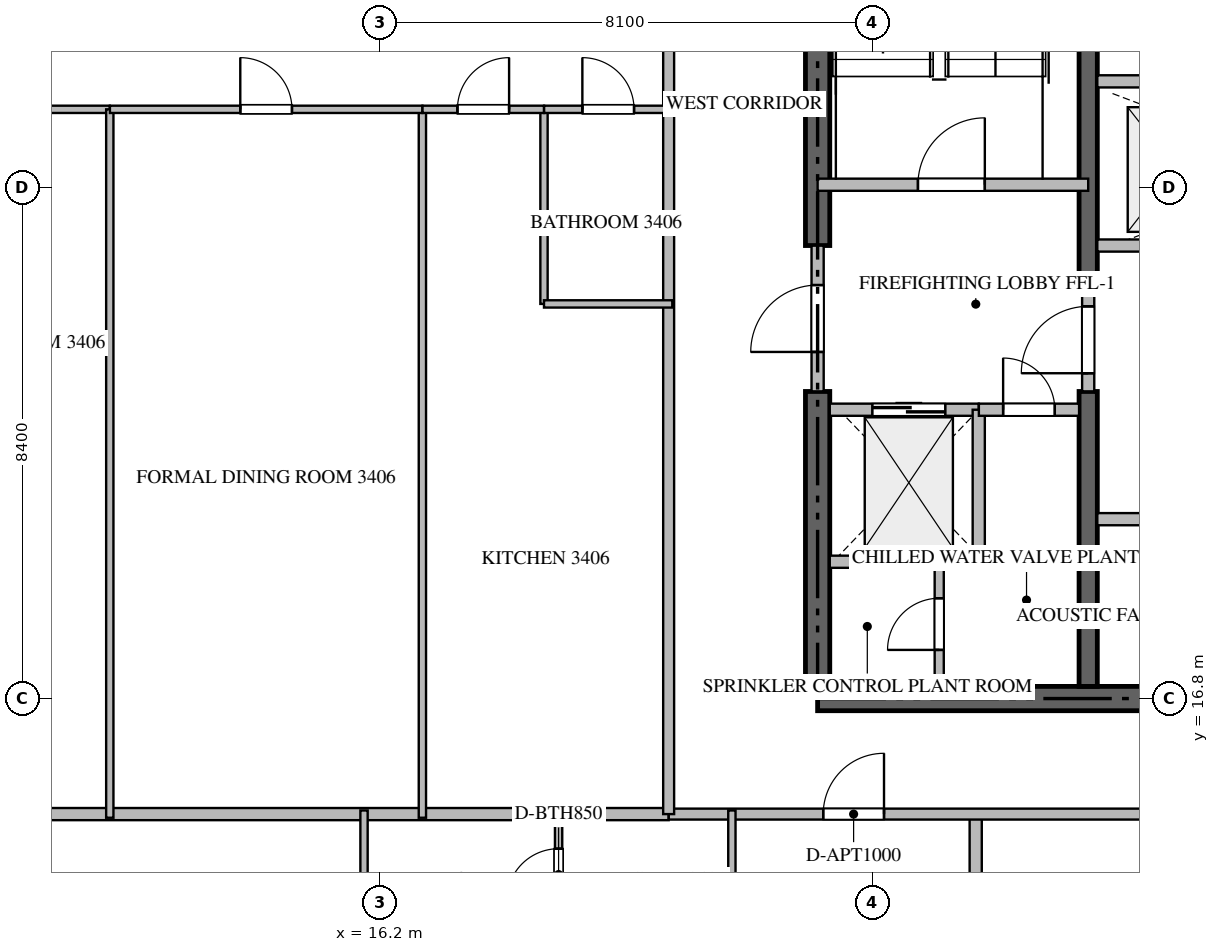
"""IFC4 building model, lengths in metres.
Left out: names, types, materials, properties, quantities, classifications, styles, units other than length and angle.
Written with IfcOpenShell. Run it as: python <this file> out.ifc"""

import sys

from ifc_helpers import new_model, si_unit, direction, frame, frame_2d, origin, place, context, subcontext, project, spatial, rectangle, extrude, source, transform, mapped, element, fill, save


model = new_model("IFC4")
c1 = context("Model", 3, precision=1e-05, world=origin(), true_north=direction((0.0, 1.0)))
c2 = subcontext(c1, "Body", "Model", "MODEL_VIEW")
j1 = project(units=[si_unit("LENGTHUNIT", "METRE"), si_unit("PLANEANGLEUNIT", "RADIAN")], contexts=[c1])
p1 = place(None, origin())
s1 = spatial("IfcSite", under=j1, at=p1, CompositionType="ELEMENT")
p2 = place(p1, origin())
s2 = spatial("IfcBuilding", under=s1, at=p2, CompositionType="ELEMENT")
p3 = place(p2, frame((0.0, 0.0, 138.9)))
s3 = spatial("IfcBuildingStorey", under=s2, at=p3, CompositionType="ELEMENT", Elevation=138.9)
p4 = place(p3, frame((23.4, 16.8, -0.26), z_axis=(0.0, 0.0, 1.0), x_axis=(1.0, 0.0, 0.0)))
e1 = element("IfcWall", 1, at=p4, inside=s3, PredefinedType="SHEAR", context=c2, shape_type="SweptSolid", body=[
    extrude(rectangle(XDim=18.0, YDim=0.4, at=frame_2d((9.0, 0.0))), origin(), (0.0, 0.0, 1.0), 3.748),
])
p5 = place(p3, frame((23.4, 17.0, -0.26), z_axis=(0.0, 0.0, 1.0), x_axis=(0.0, 1.0, 0.0)))
e2 = element("IfcWall", 2, at=p5, inside=s3, PredefinedType="SHEAR", context=c2, shape_type="SweptSolid", body=[
    extrude(rectangle(XDim=4.85, YDim=0.4, at=frame_2d((2.425, 0.0))), origin(), (0.0, 0.0, 1.0), 3.748),
])
p6 = place(p3, frame((23.4, 24.25, -0.26), z_axis=(0.0, 0.0, 1.0), x_axis=(0.0, 1.0, 0.0)))
e3 = element("IfcWall", 3, at=p6, inside=s3, PredefinedType="SHEAR", context=c2, shape_type="SweptSolid", body=[
    extrude(rectangle(XDim=9.15, YDim=0.4, at=frame_2d((4.575, 0.0))), origin(), (0.0, 0.0, 1.0), 3.748),
])
p7 = place(p3, frame((27.85, 17.0, -0.26), z_axis=(0.0, 0.0, 1.0), x_axis=(0.0, 1.0, 0.0)))
e4 = element("IfcWall", 4, at=p7, inside=s3, PredefinedType="SHEAR", context=c2, shape_type="SweptSolid", body=[
    extrude(rectangle(XDim=4.85, YDim=0.3, at=frame_2d((2.425, 0.0))), origin(), (0.0, 0.0, 1.0), 3.748),
])
p8 = place(p3, frame((27.85, 23.55, -0.26), z_axis=(0.0, 0.0, 1.0), x_axis=(0.0, 1.0, 0.0)))
e5 = element("IfcWall", 5, at=p8, inside=s3, PredefinedType="SHEAR", context=c2, shape_type="SweptSolid", body=[
    extrude(rectangle(XDim=9.85, YDim=0.3, at=frame_2d((4.925, 0.0))), origin(), (0.0, 0.0, 1.0), 3.748),
])
p9 = place(p3, frame((23.4, 25.25, 0.0), z_axis=(0.0, 0.0, 1.0), x_axis=(1.0, 0.0, 0.0)))
e6 = element("IfcWall", 6, at=p9, inside=s3, PredefinedType="STANDARD", context=c2, shape_type="SweptSolid", body=[
    extrude(rectangle(XDim=4.45, YDim=0.2, at=frame_2d((2.225, 0.0))), origin(), (0.0, 0.0, 1.0), 3.49),
])
p10 = place(p9, frame((1.65, 0.0, 0.0)))
e7 = element("IfcOpeningElement", 7, at=p10, cuts=e6, PredefinedType="OPENING", context=c2, shape_type="SweptSolid", body=[
    extrude(rectangle(XDim=1.1, YDim=2.15, at=frame_2d((0.55, 1.075))), frame((0.0, 0.11, 0.0), z_axis=(0.0, -1.0, 0.0), x_axis=(1.0, 0.0, 0.0)), (0.0, 0.0, 1.0), 0.22),
])
p11 = place(p3, frame((23.6, 21.55, 0.0), z_axis=(0.0, 0.0, 1.0), x_axis=(1.0, 0.0, 0.0)))
e8 = element("IfcWall", 8, at=p11, inside=s3, PredefinedType="STANDARD", context=c2, shape_type="SweptSolid", body=[
    extrude(rectangle(XDim=2.45, YDim=0.2, at=frame_2d((1.225, 0.0))), origin(), (0.0, 0.0, 1.0), 3.49),
])
p12 = place(p11, frame((0.7, 0.0, 0.0)))
e9 = element("IfcOpeningElement", 9, at=p12, cuts=e8, PredefinedType="OPENING", context=c2, shape_type="SweptSolid", body=[
    extrude(rectangle(XDim=1.2, YDim=2.2, at=frame_2d((0.6, 1.1))), frame((0.0, 0.11, 0.0), z_axis=(0.0, -1.0, 0.0), x_axis=(1.0, 0.0, 0.0)), (0.0, 0.0, 1.0), 0.22),
])
p13 = place(p3, frame((28.0, 24.25, 0.0), z_axis=(0.0, 0.0, 1.0), x_axis=(1.0, 0.0, 0.0)))
e10 = element("IfcWall", 10, at=p13, inside=s3, PredefinedType="STANDARD", context=c2, shape_type="SweptSolid", body=[
    extrude(rectangle(XDim=2.425, YDim=0.2, at=frame_2d((1.212, 0.0))), origin(), (0.0, 0.0, 1.0), 3.49),
])
p14 = place(p13, frame((0.75, 0.0, 0.0)))
e11 = element("IfcOpeningElement", 11, at=p14, cuts=e10, PredefinedType="OPENING", context=c2, shape_type="SweptSolid", body=[
    extrude(rectangle(XDim=1.1, YDim=2.2, at=frame_2d((0.55, 1.1))), frame((0.0, 0.11, 0.0), z_axis=(0.0, -1.0, 0.0), x_axis=(1.0, 0.0, 0.0)), (0.0, 0.0, 1.0), 0.22),
])
p15 = place(p3, frame((26.05, 19.05, 0.0), z_axis=(0.0, 0.0, 1.0), x_axis=(0.0, 1.0, 0.0)))
e12 = element("IfcWall", 12, at=p15, inside=s3, PredefinedType="STANDARD", context=c2, shape_type="SweptSolid", body=[
    extrude(rectangle(XDim=2.5, YDim=0.2, at=frame_2d((1.25, 0.0))), origin(), (0.0, 0.0, 1.0), 3.49),
])
p16 = place(p3, frame((23.6, 19.05, 0.0), z_axis=(0.0, 0.0, 1.0), x_axis=(1.0, 0.0, 0.0)))
e13 = element("IfcWall", 13, at=p16, inside=s3, PredefinedType="STANDARD", context=c2, shape_type="SweptSolid", body=[
    extrude(rectangle(XDim=2.45, YDim=0.2, at=frame_2d((1.225, 0.0))), origin(), (0.0, 0.0, 1.0), 3.49),
])
p17 = place(p3, frame((26.052, 21.55, 0.0), z_axis=(0.0, 0.0, 1.0), x_axis=(1.0, 0.0, 0.0)))
e14 = element("IfcWall", 14, at=p17, inside=s3, PredefinedType="STANDARD", context=c2, shape_type="SweptSolid", body=[
    extrude(rectangle(XDim=1.648, YDim=0.2, at=frame_2d((0.824, 0.0))), origin(), (0.0, 0.0, 1.0), 3.49),
])
p18 = place(p17, frame((0.399, 0.0, 0.0)))
e15 = element("IfcOpeningElement", 15, at=p18, cuts=e14, PredefinedType="OPENING", context=c2, shape_type="SweptSolid", body=[
    extrude(rectangle(XDim=0.85, YDim=2.1, at=frame_2d((0.425, 1.05))), frame((0.0, 0.11, 0.0), z_axis=(0.0, -1.0, 0.0), x_axis=(1.0, 0.0, 0.0)), (0.0, 0.0, 1.0), 0.22),
])
p19 = place(p3, frame((23.4, 21.852, 0.0), z_axis=(0.0, 0.0, 1.0), x_axis=(0.0, 1.0, 0.0)))
e16 = element("IfcWall", 16, at=p19, inside=s3, PredefinedType="STANDARD", context=c2, shape_type="SweptSolid", body=[
    extrude(rectangle(XDim=2.396, YDim=0.2, at=frame_2d((1.198, 0.0))), origin(), (0.0, 0.0, 1.0), 3.49),
])
p20 = place(p19, frame((0.648, 0.0, 0.0)))
e17 = element("IfcOpeningElement", 17, at=p20, cuts=e16, PredefinedType="OPENING", context=c2, shape_type="SweptSolid", body=[
    extrude(rectangle(XDim=1.1, YDim=2.15, at=frame_2d((0.55, 1.075))), frame((0.0, 0.11, 0.0), z_axis=(0.0, -1.0, 0.0), x_axis=(1.0, 0.0, 0.0)), (0.0, 0.0, 1.0), 0.22),
])
p21 = place(p3, frame((27.85, 21.852, 0.0), z_axis=(0.0, 0.0, 1.0), x_axis=(0.0, 1.0, 0.0)))
e18 = element("IfcWall", 18, at=p21, inside=s3, PredefinedType="STANDARD", context=c2, shape_type="SweptSolid", body=[
    extrude(rectangle(XDim=1.696, YDim=0.2, at=frame_2d((0.848, 0.0))), origin(), (0.0, 0.0, 1.0), 3.49),
])
p22 = place(p21, frame((0.298, 0.0, 0.0)))
e19 = element("IfcOpeningElement", 19, at=p22, cuts=e18, PredefinedType="OPENING", context=c2, shape_type="SweptSolid", body=[
    extrude(rectangle(XDim=1.1, YDim=2.15, at=frame_2d((0.55, 1.075))), frame((0.0, 0.11, 0.0), z_axis=(0.0, -1.0, 0.0), x_axis=(1.0, 0.0, 0.0)), (0.0, 0.0, 1.0), 0.22),
])
p23 = place(p3, frame((28.0, 26.95, 0.0), z_axis=(0.0, 0.0, 1.0), x_axis=(1.0, 0.0, 0.0)))
e20 = element("IfcWall", 20, at=p23, inside=s3, PredefinedType="STANDARD", context=c2, shape_type="SweptSolid", body=[
    extrude(rectangle(XDim=6.95, YDim=0.2, at=frame_2d((3.475, 0.0))), origin(), (0.0, 0.0, 1.0), 3.49),
])
p24 = place(p3, frame((25.4, 17.0, 0.0), z_axis=(0.0, 0.0, 1.0), x_axis=(0.0, 1.0, 0.0)))
e21 = element("IfcWall", 21, at=p24, inside=s3, PredefinedType="PARTITIONING", context=c2, shape_type="SweptSolid", body=[
    extrude(rectangle(XDim=2.05, YDim=0.15, at=frame_2d((1.025, 0.0))), origin(), (0.0, 0.0, 1.0), 3.49),
])
p25 = place(p24, frame((0.6, 0.0, 0.0)))
e22 = element("IfcOpeningElement", 22, at=p25, cuts=e21, PredefinedType="OPENING", context=c2, shape_type="SweptSolid", body=[
    extrude(rectangle(XDim=0.85, YDim=2.1, at=frame_2d((0.425, 1.05))), frame((0.0, 0.085, 0.0), z_axis=(0.0, -1.0, 0.0), x_axis=(1.0, 0.0, 0.0)), (0.0, 0.0, 1.0), 0.17),
])
p26 = place(p3, frame((28.0, 19.75, 0.0), z_axis=(0.0, 0.0, 1.0), x_axis=(1.0, 0.0, 0.0)))
e23 = element("IfcWall", 23, at=p26, inside=s3, PredefinedType="STANDARD", context=c2, shape_type="SweptSolid", body=[
    extrude(rectangle(XDim=4.4, YDim=0.2, at=frame_2d((2.2, 0.0))), origin(), (0.0, 0.0, 1.0), 3.49),
])
p27 = place(p26, frame((1.75, 0.0, 0.0)))
e24 = element("IfcOpeningElement", 24, at=p27, cuts=e23, PredefinedType="OPENING", context=c2, shape_type="SweptSolid", body=[
    extrude(rectangle(XDim=0.9, YDim=2.1, at=frame_2d((0.45, 1.05))), frame((0.0, 0.11, 0.0), z_axis=(0.0, -1.0, 0.0), x_axis=(1.0, 0.0, 0.0)), (0.0, 0.0, 1.0), 0.22),
])
p28 = place(p3, frame((26.0, 1.482, 0.0), z_axis=(0.0, 0.0, 1.0), x_axis=(0.0, 1.0, 0.0)))
e25 = element("IfcWall", 25, at=p28, inside=s3, PredefinedType="PARTITIONING", context=c2, shape_type="SweptSolid", body=[
    extrude(rectangle(XDim=13.418, YDim=0.2, at=frame_2d((6.709, 0.0))), origin(), (0.0, 0.0, 1.0), 3.49),
])
p29 = place(p3, frame((7.882, 14.9, 0.0), z_axis=(0.0, 0.0, 1.0), x_axis=(1.0, 0.0, 0.0)))
e26 = element("IfcWall", 26, at=p29, inside=s3, PredefinedType="PARTITIONING", context=c2, shape_type="SweptSolid", body=[
    extrude(rectangle(XDim=13.068, YDim=0.2, at=frame_2d((6.534, 0.0))), origin(), (0.0, 0.0, 1.0), 3.49),
])
p30 = place(p3, frame((20.952, 14.9, 0.0), z_axis=(0.0, 0.0, 1.0), x_axis=(1.0, 0.0, 0.0)))
e27 = element("IfcWall", 27, at=p30, inside=s3, PredefinedType="PARTITIONING", context=c2, shape_type="SweptSolid", body=[
    extrude(rectangle(XDim=22.896, YDim=0.18, at=frame_2d((11.448, 0.0))), origin(), (0.0, 0.0, 1.0), 3.49),
])
p31 = place(p30, frame((2.54, 0.0, 0.0)))
e28 = element("IfcOpeningElement", 28, at=p31, cuts=e27, PredefinedType="OPENING", context=c2, shape_type="SweptSolid", body=[
    extrude(rectangle(XDim=1.0, YDim=2.15, at=frame_2d((0.5, 1.075))), frame((0.0, 0.1, 0.0), z_axis=(0.0, -1.0, 0.0), x_axis=(1.0, 0.0, 0.0)), (0.0, 0.0, 1.0), 0.2),
])
p32 = place(p30, frame((14.911, 0.0, 0.0)))
e29 = element("IfcOpeningElement", 29, at=p32, cuts=e27, PredefinedType="OPENING", context=c2, shape_type="SweptSolid", body=[
    extrude(rectangle(XDim=1.0, YDim=2.15, at=frame_2d((0.5, 1.075))), frame((0.0, 0.1, 0.0), z_axis=(0.0, -1.0, 0.0), x_axis=(1.0, 0.0, 0.0)), (0.0, 0.0, 1.0), 0.2),
])
p33 = place(p30, frame((19.356, 0.0, 0.0)))
e30 = element("IfcOpeningElement", 30, at=p33, cuts=e27, PredefinedType="OPENING", context=c2, shape_type="SweptSolid", body=[
    extrude(rectangle(XDim=1.0, YDim=2.15, at=frame_2d((0.5, 1.075))), frame((0.0, 0.1, 0.0), z_axis=(0.0, -1.0, 0.0), x_axis=(1.0, 0.0, 0.0)), (0.0, 0.0, 1.0), 0.2),
])
p34 = place(p3, frame((20.95, 14.9, 0.0), z_axis=(0.0, 0.0, 1.0), x_axis=(0.0, 1.0, 0.0)))
e31 = element("IfcWall", 31, at=p34, inside=s3, PredefinedType="PARTITIONING", context=c2, shape_type="SweptSolid", body=[
    extrude(rectangle(XDim=18.7, YDim=0.18, at=frame_2d((9.35, 0.0))), origin(), (0.0, 0.0, 1.0), 3.49),
])
p35 = place(p34, frame((14.603, 0.0, 0.0)))
e32 = element("IfcOpeningElement", 32, at=p35, cuts=e31, PredefinedType="OPENING", context=c2, shape_type="SweptSolid", body=[
    extrude(rectangle(XDim=1.0, YDim=2.15, at=frame_2d((0.5, 1.075))), frame((0.0, 0.1, 0.0), z_axis=(0.0, -1.0, 0.0), x_axis=(1.0, 0.0, 0.0)), (0.0, 0.0, 1.0), 0.2),
])
p36 = place(p3, frame((21.99, 12.15, 0.0), z_axis=(0.0, 0.0, 1.0), x_axis=(0.0, 1.0, 0.0)))
e33 = element("IfcWall", 33, at=p36, inside=s3, PredefinedType="PARTITIONING", context=c2, shape_type="SweptSolid", body=[
    extrude(rectangle(XDim=2.81, YDim=0.12, at=frame_2d((1.405, 0.0))), origin(), (0.0, 0.0, 1.0), 3.49),
])
p37 = place(p3, frame((15.94, 12.85, 0.0), z_axis=(0.0, 0.0, 1.0), x_axis=(0.0, 1.0, 0.0)))
e34 = element("IfcWall", 34, at=p37, inside=s3, PredefinedType="PARTITIONING", context=c2, shape_type="SweptSolid", body=[
    extrude(rectangle(XDim=2.11, YDim=0.12, at=frame_2d((1.055, 0.0))), origin(), (0.0, 0.0, 1.0), 3.49),
])
p38 = place(p3, frame((19.14, 12.852, 0.0), z_axis=(0.0, 0.0, 1.0), x_axis=(0.0, 1.0, 0.0)))
e35 = element("IfcWall", 35, at=p38, inside=s3, PredefinedType="PARTITIONING", context=c2, shape_type="SweptSolid", body=[
    extrude(rectangle(XDim=2.108, YDim=0.12, at=frame_2d((1.054, 0.0))), origin(), (0.0, 0.0, 1.0), 3.49),
])
p39 = place(p38, frame((0.629, 0.0, 0.0)))
e36 = element("IfcOpeningElement", 36, at=p39, cuts=e35, PredefinedType="OPENING", context=c2, shape_type="SweptSolid", body=[
    extrude(rectangle(XDim=0.85, YDim=2.1, at=frame_2d((0.425, 1.05))), frame((0.0, 0.07, 0.0), z_axis=(0.0, -1.0, 0.0), x_axis=(1.0, 0.0, 0.0)), (0.0, 0.0, 1.0), 0.14),
])
p40 = place(p3, frame((7.895, 26.49, 0.0), z_axis=(0.0, 0.0, 1.0), x_axis=(1.0, 0.0, 0.0)))
e37 = element("IfcWall", 37, at=p40, inside=s3, PredefinedType="PARTITIONING", context=c2, shape_type="SweptSolid", body=[
    extrude(rectangle(XDim=3.864, YDim=0.12, at=frame_2d((1.932, 0.0))), origin(), (0.0, 0.0, 1.0), 3.49),
])
p41 = place(p40, frame((1.63, 0.0, 0.0)))
e38 = element("IfcOpeningElement", 38, at=p41, cuts=e37, PredefinedType="OPENING", context=c2, shape_type="SweptSolid", body=[
    extrude(rectangle(XDim=0.9, YDim=2.1, at=frame_2d((0.45, 1.05))), frame((0.0, 0.07, 0.0), z_axis=(0.0, -1.0, 0.0), x_axis=(1.0, 0.0, 0.0)), (0.0, 0.0, 1.0), 0.14),
])
p42 = place(p3, frame((11.759, 14.84, 0.0), z_axis=(0.0, 0.0, 1.0), x_axis=(0.0, 1.0, 0.0)))
e39 = element("IfcWall", 39, at=p42, inside=s3, PredefinedType="PARTITIONING", context=c2, shape_type="SweptSolid", body=[
    extrude(rectangle(XDim=11.65, YDim=0.12, at=frame_2d((5.825, 0.0))), origin(), (0.0, 0.0, 1.0), 3.49),
])
p43 = place(p3, frame((16.9, 14.84, 0.0), z_axis=(0.0, 0.0, 1.0), x_axis=(0.0, 1.0, 0.0)))
e40 = element("IfcWall", 40, at=p43, inside=s3, PredefinedType="PARTITIONING", context=c2, shape_type="SweptSolid", body=[
    extrude(rectangle(XDim=11.65, YDim=0.12, at=frame_2d((5.825, 0.0))), origin(), (0.0, 0.0, 1.0), 2.972),
])
p44 = place(p3, frame((18.9, 23.29, 0.0), z_axis=(0.0, 0.0, 1.0), x_axis=(0.0, 1.0, 0.0)))
e41 = element("IfcWall", 41, at=p44, inside=s3, PredefinedType="PARTITIONING", context=c2, shape_type="SweptSolid", body=[
    extrude(rectangle(XDim=3.2, YDim=0.12, at=frame_2d((1.6, 0.0))), origin(), (0.0, 0.0, 1.0), 3.49),
])
p45 = place(p3, frame((18.9, 23.29, 0.0), z_axis=(0.0, 0.0, 1.0), x_axis=(1.0, 0.0, 0.0)))
e42 = element("IfcWall", 42, at=p45, inside=s3, PredefinedType="PARTITIONING", context=c2, shape_type="SweptSolid", body=[
    extrude(rectangle(XDim=2.11, YDim=0.12, at=frame_2d((1.055, 0.0))), origin(), (0.0, 0.0, 1.0), 3.49),
])
p46 = place(p3, frame((11.761, 26.49, 0.0), z_axis=(0.0, 0.0, 1.0), x_axis=(1.0, 0.0, 0.0)))
e43 = element("IfcWall", 43, at=p46, inside=s3, PredefinedType="PARTITIONING", context=c2, shape_type="SweptSolid", body=[
    extrude(rectangle(XDim=5.139, YDim=0.12, at=frame_2d((2.569, 0.0))), origin(), (0.0, 0.0, 1.0), 3.49),
])
p47 = place(p46, frame((2.144, 0.0, 0.0)))
e44 = element("IfcOpeningElement", 44, at=p47, cuts=e43, PredefinedType="OPENING", context=c2, shape_type="SweptSolid", body=[
    extrude(rectangle(XDim=0.85, YDim=2.1, at=frame_2d((0.425, 1.05))), frame((0.0, 0.07, 0.0), z_axis=(0.0, -1.0, 0.0), x_axis=(1.0, 0.0, 0.0)), (0.0, 0.0, 1.0), 0.14),
])
p48 = place(p3, frame((16.902, 26.49, 0.0), z_axis=(0.0, 0.0, 1.0), x_axis=(1.0, 0.0, 0.0)))
e45 = element("IfcWall", 45, at=p48, inside=s3, PredefinedType="PARTITIONING", context=c2, shape_type="SweptSolid", body=[
    extrude(rectangle(XDim=1.998, YDim=0.12, at=frame_2d((0.999, 0.0))), origin(), (0.0, 0.0, 1.0), 3.49),
])
p49 = place(p48, frame((0.574, 0.0, 0.0)))
e46 = element("IfcOpeningElement", 46, at=p49, cuts=e45, PredefinedType="OPENING", context=c2, shape_type="SweptSolid", body=[
    extrude(rectangle(XDim=0.85, YDim=2.1, at=frame_2d((0.425, 1.05))), frame((0.0, 0.07, 0.0), z_axis=(0.0, -1.0, 0.0), x_axis=(1.0, 0.0, 0.0)), (0.0, 0.0, 1.0), 0.14),
])
p50 = place(p3, frame((18.902, 26.49, 0.0), z_axis=(0.0, 0.0, 1.0), x_axis=(1.0, 0.0, 0.0)))
e47 = element("IfcWall", 47, at=p50, inside=s3, PredefinedType="PARTITIONING", context=c2, shape_type="SweptSolid", body=[
    extrude(rectangle(XDim=2.108, YDim=0.12, at=frame_2d((1.054, 0.0))), origin(), (0.0, 0.0, 1.0), 3.49),
])
p51 = place(p50, frame((0.629, 0.0, 0.0)))
e48 = element("IfcOpeningElement", 48, at=p51, cuts=e47, PredefinedType="OPENING", context=c2, shape_type="SweptSolid", body=[
    extrude(rectangle(XDim=0.85, YDim=2.1, at=frame_2d((0.425, 1.05))), frame((0.0, 0.07, 0.0), z_axis=(0.0, -1.0, 0.0), x_axis=(1.0, 0.0, 0.0)), (0.0, 0.0, 1.0), 0.14),
])
m1 = source(origin(), c2, "Body", "SweptSolid", [
    extrude(rectangle(XDim=1.1, YDim=2.15, at=frame_2d((0.55, 1.075))), frame((0.0, 0.025, 0.0), z_axis=(0.0, -1.0, 0.0), x_axis=(1.0, 0.0, 0.0)), (0.0, 0.0, 1.0), 0.05),
])
p52 = place(p10, origin())
e49 = element("IfcDoor", 49, at=p52, inside=s3, OperationType="SINGLE_SWING_RIGHT", PredefinedType="DOOR", context=c2, shape_type="MappedRepresentation", body=[
    mapped(m1, transform((0.0, 0.0, 0.0), scale=1.0)),
])
fill(e7, e49)
m2 = source(origin(), c2, "Body", "SweptSolid", [
    extrude(rectangle(XDim=1.2, YDim=2.2, at=frame_2d((0.6, 1.1))), frame((0.0, 0.025, 0.0), z_axis=(0.0, -1.0, 0.0), x_axis=(1.0, 0.0, 0.0)), (0.0, 0.0, 1.0), 0.05),
])
p53 = place(p12, origin())
e50 = element("IfcDoor", 50, at=p53, inside=s3, OperationType="DOUBLE_DOOR_SLIDING", PredefinedType="DOOR", context=c2, shape_type="MappedRepresentation", body=[
    mapped(m2, transform((0.0, 0.0, 0.0), scale=1.0)),
])
fill(e9, e50)
m3 = source(origin(), c2, "Body", "SweptSolid", [
    extrude(rectangle(XDim=0.85, YDim=2.1, at=frame_2d((0.425, 1.05))), frame((0.0, 0.025, 0.0), z_axis=(0.0, -1.0, 0.0), x_axis=(1.0, 0.0, 0.0)), (0.0, 0.0, 1.0), 0.05),
])
p54 = place(p18, origin())
e51 = element("IfcDoor", 51, at=p54, inside=s3, OperationType="SINGLE_SWING_LEFT", PredefinedType="DOOR", context=c2, shape_type="MappedRepresentation", body=[
    mapped(m3, transform((0.0, 0.0, 0.0), scale=1.0)),
])
fill(e15, e51)
p55 = place(p20, origin())
e52 = element("IfcDoor", 52, at=p55, inside=s3, OperationType="SINGLE_SWING_LEFT", PredefinedType="DOOR", context=c2, shape_type="MappedRepresentation", body=[
    mapped(m1, transform((0.0, 0.0, 0.0), scale=1.0)),
])
fill(e17, e52)
p56 = place(p22, origin())
e53 = element("IfcDoor", 53, at=p56, inside=s3, OperationType="SINGLE_SWING_LEFT", PredefinedType="DOOR", context=c2, shape_type="MappedRepresentation", body=[
    mapped(m1, transform((0.0, 0.0, 0.0), scale=1.0)),
])
fill(e19, e53)
p57 = place(p25, origin())
e54 = element("IfcDoor", 54, at=p57, inside=s3, OperationType="SINGLE_SWING_LEFT", PredefinedType="DOOR", context=c2, shape_type="MappedRepresentation", body=[
    mapped(m3, transform((0.0, 0.0, 0.0), scale=1.0)),
])
fill(e22, e54)
m4 = source(origin(), c2, "Body", "SweptSolid", [
    extrude(rectangle(XDim=1.0, YDim=2.15, at=frame_2d((0.5, 1.075))), frame((0.0, 0.025, 0.0), z_axis=(0.0, -1.0, 0.0), x_axis=(1.0, 0.0, 0.0)), (0.0, 0.0, 1.0), 0.05),
])
p58 = place(p31, origin())
e55 = element("IfcDoor", 55, at=p58, inside=s3, OperationType="SINGLE_SWING_RIGHT", PredefinedType="DOOR", context=c2, shape_type="MappedRepresentation", body=[
    mapped(m4, transform((0.0, 0.0, 0.0), scale=1.0)),
])
fill(e28, e55)
p59 = place(p39, origin())
e56 = element("IfcDoor", 56, at=p59, inside=s3, OperationType="SINGLE_SWING_LEFT", PredefinedType="DOOR", context=c2, shape_type="MappedRepresentation", body=[
    mapped(m3, transform((0.0, 0.0, 0.0), scale=1.0)),
])
fill(e36, e56)
p60 = place(p47, origin())
e57 = element("IfcDoor", 57, at=p60, inside=s3, OperationType="SINGLE_SWING_LEFT", PredefinedType="DOOR", context=c2, shape_type="MappedRepresentation", body=[
    mapped(m3, transform((0.0, 0.0, 0.0), scale=1.0)),
])
fill(e44, e57)
p61 = place(p49, origin())
e58 = element("IfcDoor", 58, at=p61, inside=s3, OperationType="SINGLE_SWING_RIGHT", PredefinedType="DOOR", context=c2, shape_type="MappedRepresentation", body=[
    mapped(m3, transform((0.0, 0.0, 0.0), scale=1.0)),
])
fill(e46, e58)
p62 = place(p51, origin())
e59 = element("IfcDoor", 59, at=p62, inside=s3, OperationType="SINGLE_SWING_LEFT", PredefinedType="DOOR", context=c2, shape_type="MappedRepresentation", body=[
    mapped(m3, transform((0.0, 0.0, 0.0), scale=1.0)),
])
fill(e48, e59)
save(model, sys.argv[1])
